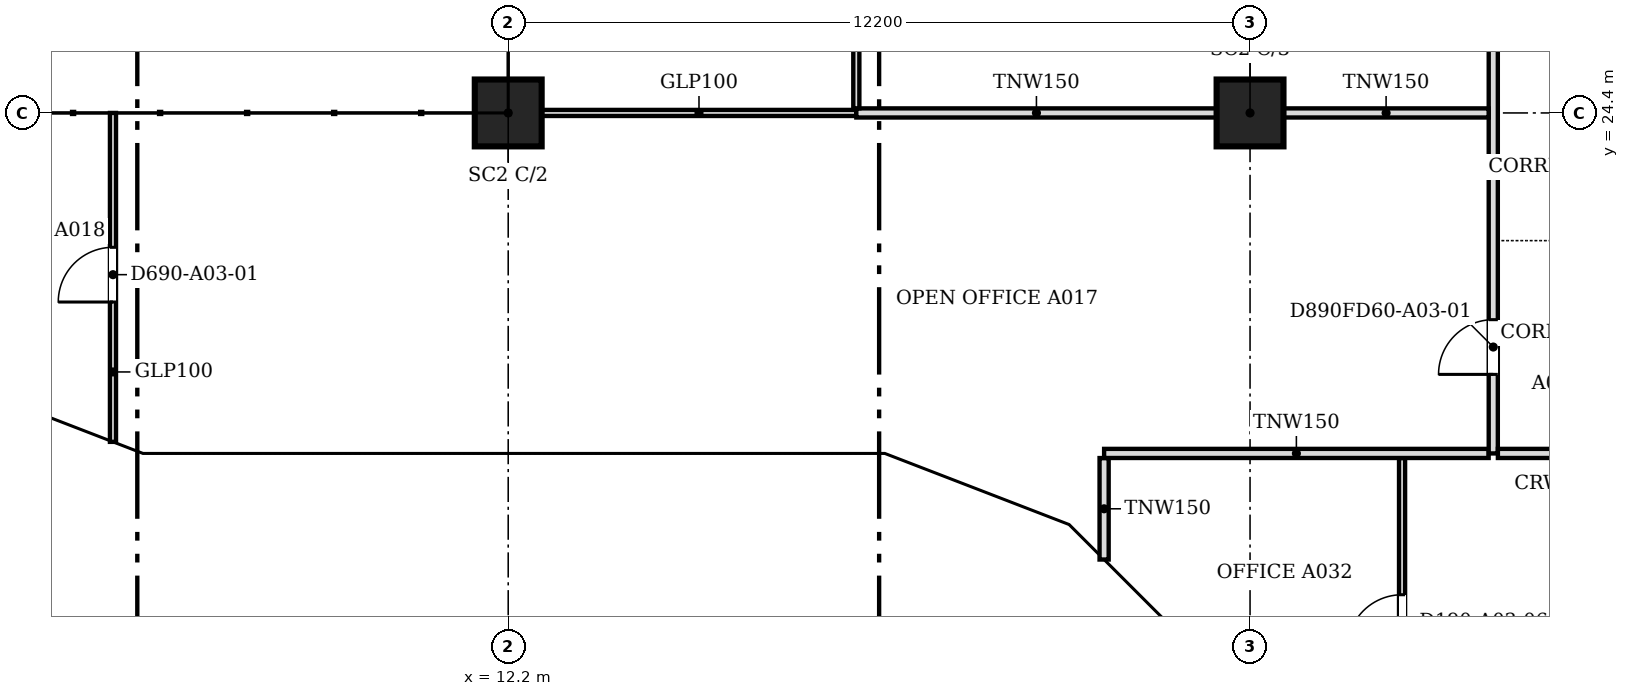
"""IFC4 building model, lengths in metres.
Left out: names, types, materials, properties, quantities, classifications, styles, units other than length and angle.
Written with IfcOpenShell. Run it as: python <this file> out.ifc"""

import sys

from ifc_helpers import new_model, si_unit, direction, frame, frame_2d, origin, origin_2d, place, context, subcontext, project, spatial, polyline, rectangle, outline, extrude, faceted_brep, source, transform, mapped, element, fill, save


model = new_model("IFC4")
c1 = context("Model", 3, precision=1e-05, world=origin(), true_north=direction((0.0, 1.0)))
c2 = subcontext(c1, "Body", "Model", "MODEL_VIEW")
j1 = project(units=[si_unit("LENGTHUNIT", "METRE"), si_unit("PLANEANGLEUNIT", "RADIAN")], contexts=[c1])
p1 = place(None, origin())
s1 = spatial("IfcSite", under=j1, at=p1, CompositionType="ELEMENT")
p2 = place(p1, origin())
s2 = spatial("IfcBuilding", under=s1, at=p2, CompositionType="ELEMENT")
p3 = place(p2, frame((0.0, 0.0, 41.0)))
s3 = spatial("IfcBuildingStorey", under=s2, at=p3, CompositionType="ELEMENT", Elevation=41.0)
for number, where, z_axis, x_axis in (
    (1, (12.2, 24.4, 0.0), (0.0, 0.0, 1.0), (1.0, 0.0, 0.0)),
    (2, (24.4, 24.4, 0.0), (0.0, 0.0, 1.0), (1.0, 0.0, 0.0)),
):
    element("IfcColumn", number, at=place(p3, frame(where, z_axis=z_axis, x_axis=x_axis)), inside=s3, PredefinedType="COLUMN", context=c2, shape_type="SweptSolid", body=[
        extrude(rectangle(XDim=1.1, YDim=1.1, at=origin_2d()), origin(), (0.0, 0.0, 1.0), 3.6),
    ])
m1 = source(origin(), c2, "Body", "Brep", [
    faceted_brep([(2.95, -0.25, 0.0), (2.997, -0.25, 0.059), (2.997, -0.25, 7.541), (2.95, -0.25, 7.6), (0.0, -0.25, 3.8), (0.053, 0.25, 3.868), (2.904, 0.25, 7.54), (2.904, 0.25, 0.06), (0.053, 0.25, 3.732), (2.95, 0.0, 0.0), (2.95, 0.0, 7.6), (0.0, 0.0, 3.8)], [[[0, 1, 2, 3, 4]], [[5, 6, 7, 8]], [[1, 0, 9]], [[10, 3, 2]], [[6, 5, 11, 4, 3, 10]], [[8, 7, 9, 0, 4, 11]], [[8, 11, 5]], [[1, 9, 7, 6, 10, 2]]]),
])
p4 = place(p3, frame((3.394, 19.612, -3.8), z_axis=(0.0, 0.0, 1.0), x_axis=(0.932990326376, -0.359901446078, 0.0)))
e3 = element("IfcWall", 3, at=p4, inside=s3, PredefinedType="SOLIDWALL", context=c2, shape_type="MappedRepresentation", body=[
    mapped(m1, transform((0.0, 0.0, 0.0), scale=1.0)),
])
m2 = source(origin(), c2, "Body", "SweptSolid", [
    extrude(outline(polyline([(2.75, 6.935), (0.316, 3.8), (2.75, 0.665), (2.75, 6.935)])), frame((0.0, 0.26, 0.0), z_axis=(0.0, -1.0, 0.0), x_axis=(1.0, 0.0, 0.0)), (0.0, 0.0, 1.0), 0.52),
])
p5 = place(p4, origin())
e4 = element("IfcOpeningElement", 4, at=p5, cuts=e3, PredefinedType="OPENING", context=c2, shape_type="MappedRepresentation", body=[
    mapped(m2, transform((0.0, 0.0, 0.0), scale=1.0)),
])
m3 = source(origin(), c2, "Body", "Brep", [
    faceted_brep([(0.047, -0.25, 0.0), (3.05, -0.25, 3.8), (0.047, -0.25, 7.6), (0.0, -0.25, 7.54), (0.0, -0.25, 0.06), (0.093, 0.25, 7.541), (3.05, 0.25, 3.8), (0.093, 0.25, 0.059), (0.047, 0.0, 0.0), (0.047, 0.0, 7.6)], [[[0, 1, 2, 3, 4]], [[5, 6, 7]], [[7, 6, 1, 0, 8]], [[6, 5, 9, 2, 1]], [[3, 2, 9]], [[8, 0, 4]], [[7, 8, 4, 3, 9, 5]]]),
])
p6 = place(p3, frame((6.1, 18.55, -3.8), z_axis=(0.0, 0.0, 1.0), x_axis=(1.0, 0.0, 0.0)))
e5 = element("IfcWall", 5, at=p6, inside=s3, PredefinedType="SOLIDWALL", context=c2, shape_type="MappedRepresentation", body=[
    mapped(m3, transform((0.0, 0.0, 0.0), scale=1.0)),
])
m4 = source(origin(), c2, "Body", "SweptSolid", [
    extrude(outline(polyline([(0.247, 0.656), (2.731, 3.8), (0.247, 6.944), (0.247, 0.656)])), frame((0.0, 0.26, 0.0), z_axis=(0.0, -1.0, 0.0), x_axis=(1.0, 0.0, 0.0)), (0.0, 0.0, 1.0), 0.52),
])
p7 = place(p6, origin())
e6 = element("IfcOpeningElement", 6, at=p7, cuts=e5, PredefinedType="OPENING", context=c2, shape_type="MappedRepresentation", body=[
    mapped(m4, transform((0.0, 0.0, 0.0), scale=1.0)),
])
m5 = source(origin(), c2, "Body", "SweptSolid", [
    extrude(outline(polyline([(3.05, 0.0), (6.1, 3.8), (3.05, 7.6), (0.0, 3.8), (3.05, 0.0)])), frame((0.0, 0.25, 0.0), z_axis=(0.0, -1.0, 0.0), x_axis=(1.0, 0.0, 0.0)), (0.0, 0.0, 1.0), 0.5),
])
p8 = place(p3, frame((9.15, 18.55, -3.8), z_axis=(0.0, 0.0, 1.0), x_axis=(1.0, 0.0, 0.0)))
e7 = element("IfcWall", 7, at=p8, inside=s3, PredefinedType="SOLIDWALL", context=c2, shape_type="MappedRepresentation", body=[
    mapped(m5, transform((0.0, 0.0, 0.0), scale=1.0)),
])
m6 = source(origin(), c2, "Body", "SweptSolid", [
    extrude(outline(polyline([(3.05, 0.399), (5.78, 3.8), (3.05, 7.201), (0.321, 3.8), (3.05, 0.399)])), frame((0.0, 0.26, 0.0), z_axis=(0.0, -1.0, 0.0), x_axis=(1.0, 0.0, 0.0)), (0.0, 0.0, 1.0), 0.52),
])
p9 = place(p8, origin())
e8 = element("IfcOpeningElement", 8, at=p9, cuts=e7, PredefinedType="OPENING", context=c2, shape_type="MappedRepresentation", body=[
    mapped(m6, transform((0.0, 0.0, 0.0), scale=1.0)),
])
m7 = source(origin(), c2, "Body", "Brep", [
    faceted_brep([(3.05, -0.25, 7.543), (0.0, -0.25, 3.8), (3.05, -0.25, 0.057), (0.0, 0.25, 3.8), (3.096, 0.25, 7.6), (3.143, 0.25, 7.544), (3.143, 0.25, 0.056), (3.096, 0.25, 0.0), (3.096, -0.0, 0.0), (3.096, -0.0, 7.6)], [[[0, 1, 2]], [[3, 4, 5, 6, 7]], [[7, 6, 8]], [[5, 4, 9]], [[4, 3, 1, 0, 9]], [[3, 7, 8, 2, 1]], [[2, 8, 6, 5, 9, 0]]]),
])
p10 = place(p3, frame((15.25, 18.55, -3.8), z_axis=(0.0, 0.0, 1.0), x_axis=(1.0, 0.0, 0.0)))
e9 = element("IfcWall", 9, at=p10, inside=s3, PredefinedType="SOLIDWALL", context=c2, shape_type="MappedRepresentation", body=[
    mapped(m7, transform((0.0, 0.0, 0.0), scale=1.0)),
])
m8 = source(origin(), c2, "Body", "SweptSolid", [
    extrude(outline(polyline([(2.896, 6.959), (0.323, 3.8), (2.896, 0.641), (2.896, 6.959)])), frame((0.0, 0.26, 0.0), z_axis=(0.0, -1.0, 0.0), x_axis=(1.0, 0.0, 0.0)), (0.0, 0.0, 1.0), 0.52),
])
p11 = place(p10, origin())
e10 = element("IfcOpeningElement", 10, at=p11, cuts=e9, PredefinedType="OPENING", context=c2, shape_type="MappedRepresentation", body=[
    mapped(m8, transform((0.0, 0.0, 0.0), scale=1.0)),
])
m9 = source(origin(), c2, "Body", "Brep", [
    faceted_brep([(0.093, -0.25, 0.056), (3.143, -0.25, 3.736), (3.143, -0.25, 3.864), (0.093, -0.25, 7.544), (0.0, 0.25, 7.543), (0.047, 0.25, 7.6), (3.196, 0.25, 3.8), (0.047, 0.25, 0.0), (0.0, 0.25, 0.057), (3.196, -0.0, 3.8), (0.047, 0.0, 0.0), (0.047, 0.0, 7.6)], [[[0, 1, 2, 3]], [[4, 5, 6, 7, 8]], [[7, 6, 9, 1, 0, 10]], [[6, 5, 11, 3, 2, 9]], [[5, 4, 11]], [[8, 7, 10]], [[8, 10, 0, 3, 11, 4]], [[1, 9, 2]]]),
])
p12 = place(p3, frame((18.303, 18.567, -3.8), z_axis=(0.0, 0.0, 1.0), x_axis=(0.932978940178, -0.359930961693, 0.0)))
e11 = element("IfcWall", 11, at=p12, inside=s3, PredefinedType="SOLIDWALL", context=c2, shape_type="MappedRepresentation", body=[
    mapped(m9, transform((0.0, 0.0, 0.0), scale=1.0)),
])
m10 = source(origin(), c2, "Body", "SweptSolid", [
    extrude(outline(polyline([(0.247, 0.633), (2.871, 3.8), (0.247, 6.967), (0.247, 0.633)])), frame((0.0, 0.26, 0.0), z_axis=(0.0, -1.0, 0.0), x_axis=(1.0, 0.0, 0.0)), (0.0, 0.0, 1.0), 0.52),
])
p13 = place(p12, origin())
e12 = element("IfcOpeningElement", 12, at=p13, cuts=e11, PredefinedType="OPENING", context=c2, shape_type="MappedRepresentation", body=[
    mapped(m10, transform((0.0, 0.0, 0.0), scale=1.0)),
])
m11 = source(origin(), c2, "Body", "Brep", [
    faceted_brep([(3.103, -0.25, 7.536), (0.053, -0.25, 3.864), (0.053, -0.25, 3.736), (3.103, -0.25, 0.064), (0.0, 0.25, 3.8), (3.156, 0.25, 7.6), (3.209, 0.25, 7.536), (3.209, 0.25, 0.064), (3.156, 0.25, 0.0), (3.156, -0.0, 0.0), (3.156, -0.0, 7.6), (0.0, 0.0, 3.8)], [[[0, 1, 2, 3]], [[4, 5, 6, 7, 8]], [[8, 7, 9]], [[6, 5, 10]], [[5, 4, 11, 1, 0, 10]], [[4, 8, 9, 3, 2, 11]], [[11, 2, 1]], [[3, 9, 7, 6, 10, 0]]]),
])
p14 = place(p3, frame((21.285, 17.417, -3.8), z_axis=(0.0, 0.0, 1.0), x_axis=(0.707106781187, -0.707106781187, 0.0)))
e13 = element("IfcWall", 13, at=p14, inside=s3, PredefinedType="SOLIDWALL", context=c2, shape_type="MappedRepresentation", body=[
    mapped(m11, transform((0.0, 0.0, 0.0), scale=1.0)),
])
m12 = source(origin(), c2, "Body", "SweptSolid", [
    extrude(outline(polyline([(2.956, 6.968), (0.325, 3.8), (2.956, 0.632), (2.956, 6.968)])), frame((0.0, 0.26, 0.0), z_axis=(0.0, -1.0, 0.0), x_axis=(1.0, 0.0, 0.0)), (0.0, 0.0, 1.0), 0.52),
])
p15 = place(p14, origin())
e14 = element("IfcOpeningElement", 14, at=p15, cuts=e13, PredefinedType="OPENING", context=c2, shape_type="MappedRepresentation", body=[
    mapped(m12, transform((0.0, 0.0, 0.0), scale=1.0)),
])
p16 = place(p2, frame((0.0, 0.0, 44.8)))
s4 = spatial("IfcBuildingStorey", under=s2, at=p16, CompositionType="ELEMENT", Elevation=44.8)
m13 = source(origin(), c2, "Body", "Brep", [
    faceted_brep([(0.053, -0.25, 0.0), (3.003, -0.25, 3.8), (0.053, -0.25, 7.6), (0.0, -0.25, 7.532), (0.0, -0.25, 0.068), (0.106, 0.25, 7.532), (2.957, 0.25, 3.86), (2.957, 0.25, 3.74), (0.106, 0.25, 0.068), (3.003, 0.0, 3.8), (0.053, 0.0, 0.0), (0.053, 0.0, 7.6)], [[[0, 1, 2, 3, 4]], [[5, 6, 7, 8]], [[8, 7, 9, 1, 0, 10]], [[6, 5, 11, 2, 1, 9]], [[3, 2, 11]], [[10, 0, 4]], [[8, 10, 4, 3, 11, 5]], [[9, 7, 6]]]),
])
p17 = place(p16, frame((3.344, 19.631, -3.8), z_axis=(0.0, 0.0, 1.0), x_axis=(0.933007896601, -0.359855894603, 0.0)))
e15 = element("IfcWall", 15, at=p17, inside=s4, PredefinedType="SOLIDWALL", context=c2, shape_type="MappedRepresentation", body=[
    mapped(m13, transform((0.0, 0.0, 0.0), scale=1.0)),
])
m14 = source(origin(), c2, "Body", "SweptSolid", [
    extrude(outline(polyline([(0.253, 0.665), (2.687, 3.8), (0.253, 6.935), (0.253, 0.665)])), frame((0.0, 0.26, 0.0), z_axis=(0.0, -1.0, 0.0), x_axis=(1.0, 0.0, 0.0)), (0.0, 0.0, 1.0), 0.52),
])
p18 = place(p17, origin())
e16 = element("IfcOpeningElement", 16, at=p18, cuts=e15, PredefinedType="OPENING", context=c2, shape_type="MappedRepresentation", body=[
    mapped(m14, transform((0.0, 0.0, 0.0), scale=1.0)),
])
m15 = source(origin(), c2, "Body", "Brep", [
    faceted_brep([(3.003, -0.25, 0.0), (6.053, -0.25, 3.8), (3.003, -0.25, 7.6), (0.0, -0.25, 3.8), (0.047, 0.25, 3.859), (3.003, 0.25, 7.6), (6.053, 0.25, 3.8), (3.003, 0.25, 0.0), (0.047, 0.25, 3.741), (0.0, 0.0, 3.8)], [[[0, 1, 2, 3]], [[4, 5, 6, 7, 8]], [[7, 6, 1, 0]], [[6, 5, 2, 1]], [[5, 4, 9, 3, 2]], [[8, 7, 0, 3, 9]], [[8, 9, 4]]]),
])
p19 = place(p16, frame((6.146, 18.55, -3.8), z_axis=(0.0, 0.0, 1.0), x_axis=(1.0, 0.0, 0.0)))
e17 = element("IfcWall", 17, at=p19, inside=s4, PredefinedType="SOLIDWALL", context=c2, shape_type="MappedRepresentation", body=[
    mapped(m15, transform((0.0, 0.0, 0.0), scale=1.0)),
])
m16 = source(origin(), c2, "Body", "SweptSolid", [
    extrude(outline(polyline([(3.005, 0.401), (5.733, 3.8), (3.005, 7.199), (0.319, 3.8), (3.005, 0.401)])), frame((0.0, 0.26, 0.0), z_axis=(0.0, -1.0, 0.0), x_axis=(1.0, 0.0, 0.0)), (0.0, 0.0, 1.0), 0.52),
])
p20 = place(p19, origin())
e18 = element("IfcOpeningElement", 18, at=p20, cuts=e17, PredefinedType="OPENING", context=c2, shape_type="MappedRepresentation", body=[
    mapped(m16, transform((0.0, 0.0, 0.0), scale=1.0)),
])
m17 = source(origin(), c2, "Body", "Brep", [
    faceted_brep([(3.05, -0.25, 0.0), (6.1, -0.25, 3.743), (6.1, -0.25, 3.857), (3.05, -0.25, 7.6), (0.0, -0.25, 3.8), (0.0, 0.25, 3.8), (3.05, 0.25, 7.6), (6.146, 0.25, 3.8), (3.05, 0.25, 0.0), (6.146, -0.0, 3.8)], [[[0, 1, 2, 3, 4]], [[5, 6, 7, 8]], [[8, 7, 9, 1, 0]], [[7, 6, 3, 2, 9]], [[6, 5, 4, 3]], [[5, 8, 0, 4]], [[1, 9, 2]]]),
])
p21 = place(p16, frame((12.2, 18.55, -3.8), z_axis=(0.0, 0.0, 1.0), x_axis=(1.0, 0.0, 0.0)))
e19 = element("IfcWall", 19, at=p21, inside=s4, PredefinedType="SOLIDWALL", context=c2, shape_type="MappedRepresentation", body=[
    mapped(m17, transform((0.0, 0.0, 0.0), scale=1.0)),
])
m18 = source(origin(), c2, "Body", "SweptSolid", [
    extrude(outline(polyline([(3.052, 0.397), (5.824, 3.8), (3.052, 7.202), (0.321, 3.8), (3.052, 0.397)])), frame((0.0, 0.26, 0.0), z_axis=(0.0, -1.0, 0.0), x_axis=(1.0, 0.0, 0.0)), (0.0, 0.0, 1.0), 0.52),
])
p22 = place(p21, origin())
e20 = element("IfcOpeningElement", 20, at=p22, cuts=e19, PredefinedType="OPENING", context=c2, shape_type="MappedRepresentation", body=[
    mapped(m18, transform((0.0, 0.0, 0.0), scale=1.0)),
])
m19 = source(origin(), c2, "Body", "Brep", [
    faceted_brep([(3.096, -0.25, 7.536), (0.047, -0.25, 3.856), (0.047, -0.25, 3.744), (3.096, -0.25, 0.064), (0.0, 0.25, 3.8), (3.149, 0.25, 7.6), (3.202, 0.25, 7.536), (3.202, 0.25, 0.064), (3.149, 0.25, 0.0), (3.149, -0.0, 0.0), (3.149, -0.0, 7.6), (0.0, 0.0, 3.8)], [[[0, 1, 2, 3]], [[4, 5, 6, 7, 8]], [[8, 7, 9]], [[6, 5, 10]], [[5, 4, 11, 1, 0, 10]], [[4, 8, 9, 3, 2, 11]], [[11, 2, 1]], [[3, 9, 7, 6, 10, 0]]]),
])
p23 = place(p16, frame((18.346, 18.55, -3.8), z_axis=(0.0, 0.0, 1.0), x_axis=(0.932985567668, -0.359913782069, 0.0)))
e21 = element("IfcWall", 21, at=p23, inside=s4, PredefinedType="SOLIDWALL", context=c2, shape_type="MappedRepresentation", body=[
    mapped(m19, transform((0.0, 0.0, 0.0), scale=1.0)),
])
m20 = source(origin(), c2, "Body", "SweptSolid", [
    extrude(outline(polyline([(2.949, 6.967), (0.325, 3.8), (2.949, 0.633), (2.949, 6.967)])), frame((0.0, 0.26, 0.0), z_axis=(0.0, -1.0, 0.0), x_axis=(1.0, 0.0, 0.0)), (0.0, 0.0, 1.0), 0.52),
])
p24 = place(p23, origin())
e22 = element("IfcOpeningElement", 22, at=p24, cuts=e21, PredefinedType="OPENING", context=c2, shape_type="MappedRepresentation", body=[
    mapped(m20, transform((0.0, 0.0, 0.0), scale=1.0)),
])
m21 = source(origin(), c2, "Body", "Brep", [
    faceted_brep([(0.106, -0.25, 0.064), (3.156, -0.25, 3.736), (3.156, -0.25, 3.864), (0.106, -0.25, 7.536), (0.0, 0.25, 7.536), (0.053, 0.25, 7.6), (3.209, 0.25, 3.8), (0.053, 0.25, 0.0), (0.0, 0.25, 0.064), (3.209, -0.0, 3.8), (0.053, 0.0, 0.0), (0.053, 0.0, 7.6)], [[[0, 1, 2, 3]], [[4, 5, 6, 7, 8]], [[7, 6, 9, 1, 0, 10]], [[6, 5, 11, 3, 2, 9]], [[5, 4, 11]], [[8, 7, 10]], [[8, 10, 0, 3, 11, 4]], [[1, 9, 2]]]),
])
p25 = place(p16, frame((21.248, 17.454, -3.8), z_axis=(0.0, 0.0, 1.0), x_axis=(0.707106781187, -0.707106781187, 0.0)))
e23 = element("IfcWall", 23, at=p25, inside=s4, PredefinedType="SOLIDWALL", context=c2, shape_type="MappedRepresentation", body=[
    mapped(m21, transform((0.0, 0.0, 0.0), scale=1.0)),
])
m22 = source(origin(), c2, "Body", "SweptSolid", [
    extrude(outline(polyline([(0.253, 0.632), (2.884, 3.8), (0.253, 6.968), (0.253, 0.632)])), frame((0.0, 0.26, 0.0), z_axis=(0.0, -1.0, 0.0), x_axis=(1.0, 0.0, 0.0)), (0.0, 0.0, 1.0), 0.52),
])
p26 = place(p25, origin())
e24 = element("IfcOpeningElement", 24, at=p26, cuts=e23, PredefinedType="OPENING", context=c2, shape_type="MappedRepresentation", body=[
    mapped(m22, transform((0.0, 0.0, 0.0), scale=1.0)),
])
p27 = place(p3, frame((26.9, 13.276, 0.0), z_axis=(0.0, 0.0, 1.0), x_axis=(0.0, 1.0, 0.0)))
e25 = element("IfcWall", 25, at=p27, inside=s3, PredefinedType="PARTITIONING", context=c2, shape_type="SweptSolid", body=[
    extrude(rectangle(XDim=5.448, YDim=0.1, at=frame_2d((2.724, 0.0))), origin(), (0.0, 0.0, 1.0), 3.067),
])
m23 = source(origin(), c2, "Body", "SweptSolid", [
    extrude(rectangle(XDim=0.9, YDim=2.1, at=frame_2d((0.45, 1.05))), frame((0.0, 0.06, 0.0), z_axis=(0.0, -1.0, 0.0), x_axis=(1.0, 0.0, 0.0)), (0.0, 0.0, 1.0), 0.12),
])
p28 = place(p27, frame((2.3, 0.0, 0.0)))
e26 = element("IfcOpeningElement", 26, at=p28, cuts=e25, PredefinedType="OPENING", context=c2, shape_type="MappedRepresentation", body=[
    mapped(m23, transform((0.0, 0.0, 0.0), scale=1.0)),
])
p29 = place(p3, frame((22.0, 17.055, 0.0), z_axis=(0.0, 0.0, 1.0), x_axis=(0.0, 1.0, 0.0)))
e27 = element("IfcWall", 27, at=p29, inside=s3, PredefinedType="PARTITIONING", context=c2, shape_type="SweptSolid", body=[
    extrude(rectangle(XDim=1.669, YDim=0.15, at=frame_2d((0.834, 0.0))), origin(), (0.0, 0.0, 1.0), 3.067),
])
p30 = place(p3, frame((22.0, 18.8, 0.0), z_axis=(0.0, 0.0, 1.0), x_axis=(1.0, 0.0, 0.0)))
e28 = element("IfcWall", 28, at=p30, inside=s3, PredefinedType="PARTITIONING", context=c2, shape_type="SweptSolid", body=[
    extrude(rectangle(XDim=6.324, YDim=0.15, at=frame_2d((3.162, 0.0))), origin(), (0.0, 0.0, 1.0), 3.067),
])
p31 = place(p3, frame((28.4, 18.8, 0.0), z_axis=(0.0, 0.0, 1.0), x_axis=(0.0, 1.0, 0.0)))
e29 = element("IfcWall", 29, at=p31, inside=s3, PredefinedType="PARTITIONING", context=c2, shape_type="SweptSolid", body=[
    extrude(rectangle(XDim=26.824, YDim=0.15, at=frame_2d((13.412, 0.0))), origin(), (0.0, 0.0, 1.0), 3.067),
])
m24 = source(origin(), c2, "Body", "SweptSolid", [
    extrude(rectangle(XDim=0.9, YDim=2.1, at=frame_2d((0.45, 1.05))), frame((0.0, 0.085, 0.0), z_axis=(0.0, -1.0, 0.0), x_axis=(1.0, 0.0, 0.0)), (0.0, 0.0, 1.0), 0.17),
])
p32 = place(p31, frame((1.3, 0.0, 0.0)))
e30 = element("IfcOpeningElement", 30, at=p32, cuts=e29, PredefinedType="OPENING", context=c2, shape_type="MappedRepresentation", body=[
    mapped(m24, transform((0.0, 0.0, 0.0), scale=1.0)),
])
p33 = place(p31, frame((14.301, 0.0, 0.0)))
e31 = element("IfcOpeningElement", 31, at=p33, cuts=e29, PredefinedType="OPENING", context=c2, shape_type="MappedRepresentation", body=[
    mapped(m24, transform((0.0, 0.0, 0.0), scale=1.0)),
])
p34 = place(p31, frame((8.2, 0.0, 0.0)))
e32 = element("IfcOpeningElement", 32, at=p34, cuts=e29, PredefinedType="OPENING", context=c2, shape_type="MappedRepresentation", body=[
    mapped(m24, transform((0.0, 0.0, 0.0), scale=1.0)),
])
p35 = place(p31, frame((21.9, 0.0, 0.0)))
e33 = element("IfcOpeningElement", 33, at=p35, cuts=e29, PredefinedType="OPENING", context=c2, shape_type="MappedRepresentation", body=[
    mapped(m24, transform((0.0, 0.0, 0.0), scale=1.0)),
])
p36 = place(p3, frame((28.476, 18.8, 0.0), z_axis=(0.0, 0.0, 1.0), x_axis=(1.0, 0.0, 0.0)))
e34 = element("IfcWall", 34, at=p36, inside=s3, PredefinedType="PARTITIONING", context=c2, shape_type="SweptSolid", body=[
    extrude(rectangle(XDim=1.948, YDim=0.15, at=frame_2d((0.974, 0.0))), origin(), (0.0, 0.0, 1.0), 3.067),
])
p37 = place(p3, frame((5.7, 18.99, 0.0), z_axis=(0.0, 0.0, 1.0), x_axis=(0.0, 1.0, 0.0)))
e35 = element("IfcWall", 35, at=p37, inside=s3, PredefinedType="PARTITIONING", context=c2, shape_type="SweptSolid", body=[
    extrude(rectangle(XDim=5.41, YDim=0.1, at=frame_2d((2.705, 0.0))), origin(), (0.0, 0.0, 1.0), 3.067),
])
p38 = place(p37, frame((2.3, 0.0, 0.0)))
e36 = element("IfcOpeningElement", 36, at=p38, cuts=e35, PredefinedType="OPENING", context=c2, shape_type="MappedRepresentation", body=[
    mapped(m23, transform((0.0, 0.0, 0.0), scale=1.0)),
])
p39 = place(p3, frame((12.751, 24.4, 0.0), z_axis=(0.0, 0.0, 1.0), x_axis=(1.0, 0.0, 0.0)))
e37 = element("IfcWall", 37, at=p39, inside=s3, PredefinedType="PARTITIONING", context=c2, shape_type="SweptSolid", body=[
    extrude(rectangle(XDim=5.173, YDim=0.1, at=frame_2d((2.586, 0.0))), origin(), (0.0, 0.0, 1.0), 3.067),
])
p40 = place(p3, frame((17.925, 24.4, 0.0), z_axis=(0.0, 0.0, 1.0), x_axis=(1.0, 0.0, 0.0)))
e38 = element("IfcWall", 38, at=p40, inside=s3, PredefinedType="PARTITIONING", context=c2, shape_type="SweptSolid", body=[
    extrude(rectangle(XDim=5.924, YDim=0.15, at=frame_2d((2.962, 0.0))), origin(), (0.0, 0.0, 1.0), 3.067),
])
p41 = place(p3, frame((24.951, 24.4, 0.0), z_axis=(0.0, 0.0, 1.0), x_axis=(1.0, 0.0, 0.0)))
e39 = element("IfcWall", 39, at=p41, inside=s3, PredefinedType="PARTITIONING", context=c2, shape_type="SweptSolid", body=[
    extrude(rectangle(XDim=3.373, YDim=0.15, at=frame_2d((1.687, 0.0))), origin(), (0.0, 0.0, 1.0), 3.067),
])
p42 = place(p3, frame((17.925, 24.476, 0.0), z_axis=(0.0, 0.0, 1.0), x_axis=(0.0, 1.0, 0.0)))
e40 = element("IfcWall", 40, at=p42, inside=s3, PredefinedType="PARTITIONING", context=c2, shape_type="SweptSolid", body=[
    extrude(rectangle(XDim=5.948, YDim=0.1, at=frame_2d((2.974, 0.0))), origin(), (0.0, 0.0, 1.0), 3.067),
])
p43 = place(p42, frame((2.5, 0.0, 0.0)))
e41 = element("IfcOpeningElement", 41, at=p43, cuts=e40, PredefinedType="OPENING", context=c2, shape_type="MappedRepresentation", body=[
    mapped(m23, transform((0.0, 0.0, 0.0), scale=1.0)),
])
m25 = source(origin(), c2, "Body", "SweptSolid", [
    extrude(rectangle(XDim=0.9, YDim=2.1, at=frame_2d((0.45, 1.05))), frame((0.0, 0.025, 0.0), z_axis=(0.0, -1.0, 0.0), x_axis=(1.0, 0.0, 0.0)), (0.0, 0.0, 1.0), 0.05),
])
p44 = place(p32, origin())
e42 = element("IfcDoor", 42, at=p44, inside=s3, OperationType="SINGLE_SWING_LEFT", PredefinedType="DOOR", context=c2, shape_type="MappedRepresentation", body=[
    mapped(m25, transform((0.0, 0.0, 0.0), scale=1.0)),
])
fill(e30, e42)
p45 = place(p38, origin())
e43 = element("IfcDoor", 43, at=p45, inside=s3, OperationType="SINGLE_SWING_LEFT", PredefinedType="DOOR", context=c2, shape_type="MappedRepresentation", body=[
    mapped(m25, transform((0.0, 0.0, 0.0), scale=1.0)),
])
fill(e36, e43)
p46 = place(p28, origin())
e44 = element("IfcDoor", 44, at=p46, inside=s3, OperationType="SINGLE_SWING_LEFT", PredefinedType="DOOR", context=c2, shape_type="MappedRepresentation", body=[
    mapped(m25, transform((0.0, 0.0, 0.0), scale=1.0)),
])
fill(e26, e44)
save(model, sys.argv[1])
